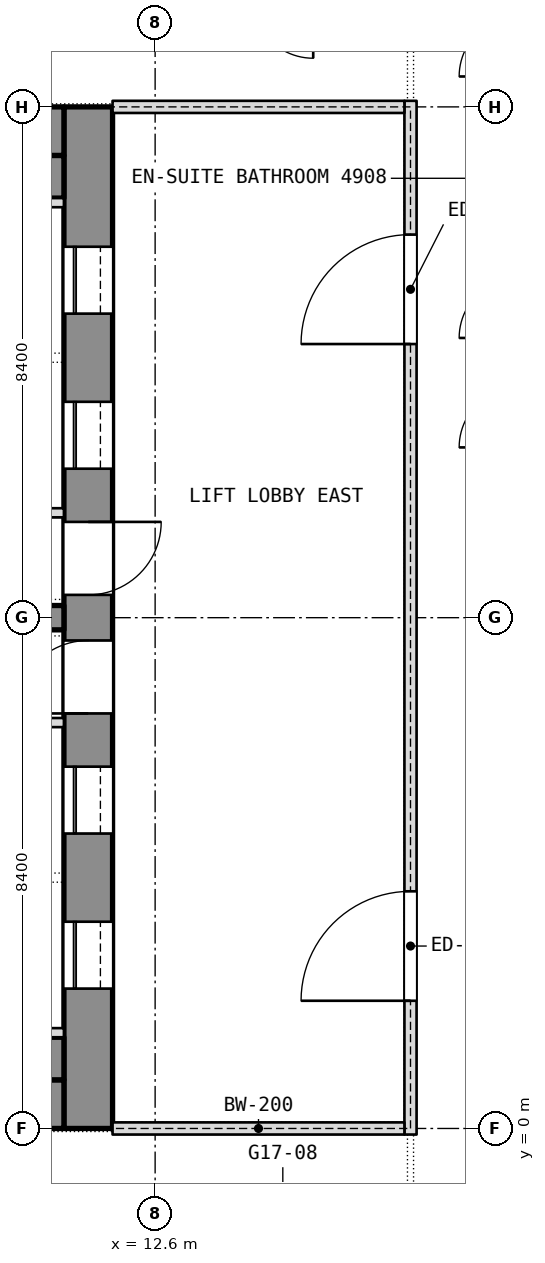
"""IFC4 building model, lengths in metres.
Left out: names, types, materials, properties, quantities, classifications, styles, units other than length and angle.
Written with IfcOpenShell. Run it as: python <this file> out.ifc"""

import sys

from ifc_helpers import new_model, si_unit, direction, frame, frame_2d, origin, place, context, subcontext, project, spatial, rectangle, extrude, element, fill, save


model = new_model("IFC4")
c1 = context("Model", 3, precision=1e-05, world=origin(), true_north=direction((0.0, 1.0)))
c2 = subcontext(c1, "Body", "Model", "MODEL_VIEW")
j1 = project(units=[si_unit("LENGTHUNIT", "METRE"), si_unit("PLANEANGLEUNIT", "RADIAN")], contexts=[c1])
p1 = place(None, origin())
s1 = spatial("IfcSite", under=j1, at=p1, CompositionType="ELEMENT")
p2 = place(p1, origin())
s2 = spatial("IfcBuilding", under=s1, at=p2, CompositionType="ELEMENT")
p3 = place(p2, frame((0.0, 0.0, 212.9)))
s3 = spatial("IfcBuildingStorey", under=s2, at=p3, CompositionType="ELEMENT", Elevation=212.9)
p4 = place(p3, frame((11.5, 0.0, 0.0), z_axis=(0.0, 0.0, 1.0), x_axis=(0.0, 1.0, 0.0)))
e1 = element("IfcWall", 1, at=p4, inside=s3, PredefinedType="SHEAR", context=c2, shape_type="SweptSolid", body=[
    extrude(rectangle(XDim=16.8, YDim=0.8, at=frame_2d((8.4, 0.0))), origin(), (0.0, 0.0, 1.0), 3.6),
])
p5 = place(p4, frame((2.3, 0.0, 0.0)))
e2 = element("IfcOpeningElement", 2, at=p5, cuts=e1, PredefinedType="OPENING", context=c2, shape_type="SweptSolid", body=[
    extrude(rectangle(XDim=1.1, YDim=2.1, at=frame_2d((0.55, 1.05))), frame((0.0, 0.4, 0.0), z_axis=(0.0, -1.0, 0.0), x_axis=(1.0, 0.0, 0.0)), (0.0, 0.0, 1.0), 0.8),
])
p6 = place(p4, frame((4.85, 0.0, 0.0)))
e3 = element("IfcOpeningElement", 3, at=p6, cuts=e1, PredefinedType="OPENING", context=c2, shape_type="SweptSolid", body=[
    extrude(rectangle(XDim=1.1, YDim=2.1, at=frame_2d((0.55, 1.05))), frame((0.0, 0.4, 0.0), z_axis=(0.0, -1.0, 0.0), x_axis=(1.0, 0.0, 0.0)), (0.0, 0.0, 1.0), 0.8),
])
p7 = place(p4, frame((6.825, 0.0, 0.0)))
e4 = element("IfcOpeningElement", 4, at=p7, cuts=e1, PredefinedType="OPENING", context=c2, shape_type="SweptSolid", body=[
    extrude(rectangle(XDim=1.2, YDim=2.1, at=frame_2d((0.6, 1.05))), frame((0.0, 0.4, 0.0), z_axis=(0.0, -1.0, 0.0), x_axis=(1.0, 0.0, 0.0)), (0.0, 0.0, 1.0), 0.8),
])
p8 = place(p4, frame((13.4, 0.0, 0.0)))
e5 = element("IfcOpeningElement", 5, at=p8, cuts=e1, PredefinedType="OPENING", context=c2, shape_type="SweptSolid", body=[
    extrude(rectangle(XDim=1.1, YDim=2.1, at=frame_2d((0.55, 1.05))), frame((0.0, 0.4, 0.0), z_axis=(0.0, -1.0, 0.0), x_axis=(1.0, 0.0, 0.0)), (0.0, 0.0, 1.0), 0.8),
])
p9 = place(p4, frame((10.85, 0.0, 0.0)))
e6 = element("IfcOpeningElement", 6, at=p9, cuts=e1, PredefinedType="OPENING", context=c2, shape_type="SweptSolid", body=[
    extrude(rectangle(XDim=1.1, YDim=2.1, at=frame_2d((0.55, 1.05))), frame((0.0, 0.4, 0.0), z_axis=(0.0, -1.0, 0.0), x_axis=(1.0, 0.0, 0.0)), (0.0, 0.0, 1.0), 0.8),
])
p10 = place(p4, frame((8.775, 0.0, 0.0)))
e7 = element("IfcOpeningElement", 7, at=p10, cuts=e1, PredefinedType="OPENING", context=c2, shape_type="SweptSolid", body=[
    extrude(rectangle(XDim=1.2, YDim=2.1, at=frame_2d((0.6, 1.05))), frame((0.0, 0.4, 0.0), z_axis=(0.0, -1.0, 0.0), x_axis=(1.0, 0.0, 0.0)), (0.0, 0.0, 1.0), 0.8),
])
for number, where, z_axis, x_axis in (
    (8, (-11.1, 0.4, 0.0), (0.0, 0.0, 1.0), (1.0, 0.0, 0.0)),
    (9, (-11.1, 16.4, 0.0), (0.0, 0.0, 1.0), (1.0, 0.0, 0.0)),
):
    element("IfcWall", number, at=place(p3, frame(where, z_axis=z_axis, x_axis=x_axis)), inside=s3, PredefinedType="SHEAR", context=c2, shape_type="SweptSolid", body=[
        extrude(rectangle(XDim=22.2, YDim=0.8, at=frame_2d((11.1, 0.0))), origin(), (0.0, 0.0, 1.0), 3.6),
    ])
p11 = place(p3, frame((4.4, 8.4, 0.0), z_axis=(0.0, 0.0, 1.0), x_axis=(1.0, 0.0, 0.0)))
e10 = element("IfcWall", 10, at=p11, inside=s3, PredefinedType="SHEAR", context=c2, shape_type="SweptSolid", body=[
    extrude(rectangle(XDim=6.7, YDim=0.4, at=frame_2d((3.35, 0.0))), origin(), (0.0, 0.0, 1.0), 3.6),
])
for number, where, z_axis, x_axis in (
    (11, (-11.1, 1.15, 0.0), (0.0, 0.0, 1.0), (1.0, 0.0, 0.0)),
    (12, (-11.1, 15.65, 0.0), (0.0, 0.0, 1.0), (1.0, 0.0, 0.0)),
):
    element("IfcWall", number, at=place(p3, frame(where, z_axis=z_axis, x_axis=x_axis)), inside=s3, PredefinedType="PARTITIONING", context=c2, shape_type="SweptSolid", body=[
        extrude(rectangle(XDim=22.2, YDim=0.7, at=frame_2d((11.1, 0.0))), origin(), (0.0, 0.0, 1.0), 3.34),
    ])
for number, where, z_axis, x_axis in (
    (13, (9.0, 6.675, 0.0), (0.0, 0.0, 1.0), (1.0, 0.0, 0.0)),
    (14, (9.0, 1.575, 0.0), (0.0, 0.0, 1.0), (1.0, 0.0, 0.0)),
    (15, (9.0, 10.125, 0.0), (0.0, 0.0, 1.0), (1.0, 0.0, 0.0)),
    (16, (9.0, 15.225, 0.0), (0.0, 0.0, 1.0), (1.0, 0.0, 0.0)),
):
    element("IfcWall", number, at=place(p3, frame(where, z_axis=z_axis, x_axis=x_axis)), inside=s3, PredefinedType="SHEAR", context=c2, shape_type="SweptSolid", body=[
        extrude(rectangle(XDim=2.1, YDim=0.15, at=frame_2d((1.05, 0.0))), origin(), (0.0, 0.0, 1.0), 3.6),
    ])
p12 = place(p3, frame((16.8, -0.1, 0.0), z_axis=(0.0, 0.0, 1.0), x_axis=(0.0, 1.0, 0.0)))
e17 = element("IfcWall", 17, at=p12, inside=s3, PredefinedType="PARTITIONING", context=c2, shape_type="SweptSolid", body=[
    extrude(rectangle(XDim=17.0, YDim=0.2, at=frame_2d((8.5, 0.0))), origin(), (0.0, 0.0, 1.0), 3.34),
])
p13 = place(p12, frame((2.2, 0.0, 0.0)))
e18 = element("IfcOpeningElement", 18, at=p13, cuts=e17, PredefinedType="OPENING", context=c2, shape_type="SweptSolid", body=[
    extrude(rectangle(XDim=1.8, YDim=2.1, at=frame_2d((0.9, 1.05))), frame((0.0, 0.1, 0.0), z_axis=(0.0, -1.0, 0.0), x_axis=(1.0, 0.0, 0.0)), (0.0, 0.0, 1.0), 0.2),
])
p14 = place(p12, frame((13.0, 0.0, 0.0)))
e19 = element("IfcOpeningElement", 19, at=p14, cuts=e17, PredefinedType="OPENING", context=c2, shape_type="SweptSolid", body=[
    extrude(rectangle(XDim=1.8, YDim=2.1, at=frame_2d((0.9, 1.05))), frame((0.0, 0.1, 0.0), z_axis=(0.0, -1.0, 0.0), x_axis=(1.0, 0.0, 0.0)), (0.0, 0.0, 1.0), 0.2),
])
for number, where, z_axis, x_axis in (
    (20, (11.9, 0.0, 0.0), (0.0, 0.0, 1.0), (1.0, 0.0, 0.0)),
    (21, (11.9, 16.8, 0.0), (0.0, 0.0, 1.0), (1.0, 0.0, 0.0)),
):
    element("IfcWall", number, at=place(p3, frame(where, z_axis=z_axis, x_axis=x_axis)), inside=s3, PredefinedType="PARTITIONING", context=c2, shape_type="SweptSolid", body=[
        extrude(rectangle(XDim=4.8, YDim=0.2, at=frame_2d((2.4, 0.0))), origin(), (0.0, 0.0, 1.0), 2.94),
    ])
p15 = place(p5, origin())
e22 = element("IfcDoor", 22, at=p15, inside=s3, OperationType="SLIDING_TO_LEFT", PredefinedType="DOOR", context=c2, shape_type="SweptSolid", body=[
    extrude(rectangle(XDim=1.1, YDim=2.1, at=frame_2d((0.55, 1.05))), frame((0.0, 0.025, 0.0), z_axis=(0.0, -1.0, 0.0), x_axis=(1.0, 0.0, 0.0)), (0.0, 0.0, 1.0), 0.05),
])
fill(e2, e22)
p16 = place(p6, origin())
e23 = element("IfcDoor", 23, at=p16, inside=s3, OperationType="SLIDING_TO_LEFT", PredefinedType="DOOR", context=c2, shape_type="SweptSolid", body=[
    extrude(rectangle(XDim=1.1, YDim=2.1, at=frame_2d((0.55, 1.05))), frame((0.0, 0.025, 0.0), z_axis=(0.0, -1.0, 0.0), x_axis=(1.0, 0.0, 0.0)), (0.0, 0.0, 1.0), 0.05),
])
fill(e3, e23)
p17 = place(p7, origin())
e24 = element("IfcDoor", 24, at=p17, inside=s3, OperationType="SINGLE_SWING_LEFT", PredefinedType="DOOR", context=c2, shape_type="SweptSolid", body=[
    extrude(rectangle(XDim=1.2, YDim=2.1, at=frame_2d((0.6, 1.05))), frame((0.0, 0.025, 0.0), z_axis=(0.0, -1.0, 0.0), x_axis=(1.0, 0.0, 0.0)), (0.0, 0.0, 1.0), 0.05),
])
fill(e4, e24)
p18 = place(p8, origin())
e25 = element("IfcDoor", 25, at=p18, inside=s3, OperationType="SLIDING_TO_LEFT", PredefinedType="DOOR", context=c2, shape_type="SweptSolid", body=[
    extrude(rectangle(XDim=1.1, YDim=2.1, at=frame_2d((0.55, 1.05))), frame((0.0, 0.025, 0.0), z_axis=(0.0, -1.0, 0.0), x_axis=(1.0, 0.0, 0.0)), (0.0, 0.0, 1.0), 0.05),
])
fill(e5, e25)
p19 = place(p9, origin())
e26 = element("IfcDoor", 26, at=p19, inside=s3, OperationType="SLIDING_TO_LEFT", PredefinedType="DOOR", context=c2, shape_type="SweptSolid", body=[
    extrude(rectangle(XDim=1.1, YDim=2.1, at=frame_2d((0.55, 1.05))), frame((0.0, 0.025, 0.0), z_axis=(0.0, -1.0, 0.0), x_axis=(1.0, 0.0, 0.0)), (0.0, 0.0, 1.0), 0.05),
])
fill(e6, e26)
p20 = place(p10, origin())
e27 = element("IfcDoor", 27, at=p20, inside=s3, OperationType="SINGLE_SWING_LEFT", PredefinedType="DOOR", context=c2, shape_type="SweptSolid", body=[
    extrude(rectangle(XDim=1.2, YDim=2.1, at=frame_2d((0.6, 1.05))), frame((0.0, 0.025, 0.0), z_axis=(0.0, -1.0, 0.0), x_axis=(1.0, 0.0, 0.0)), (0.0, 0.0, 1.0), 0.05),
])
fill(e7, e27)
p21 = place(p13, origin())
e28 = element("IfcDoor", 28, at=p21, inside=s3, OperationType="DOUBLE_DOOR_SINGLE_SWING", PredefinedType="DOOR", context=c2, shape_type="SweptSolid", body=[
    extrude(rectangle(XDim=1.8, YDim=2.1, at=frame_2d((0.9, 1.05))), frame((0.0, 0.025, 0.0), z_axis=(0.0, -1.0, 0.0), x_axis=(1.0, 0.0, 0.0)), (0.0, 0.0, 1.0), 0.05),
])
fill(e18, e28)
p22 = place(p14, origin())
e29 = element("IfcDoor", 29, at=p22, inside=s3, OperationType="DOUBLE_DOOR_SINGLE_SWING", PredefinedType="DOOR", context=c2, shape_type="SweptSolid", body=[
    extrude(rectangle(XDim=1.8, YDim=2.1, at=frame_2d((0.9, 1.05))), frame((0.0, 0.025, 0.0), z_axis=(0.0, -1.0, 0.0), x_axis=(1.0, 0.0, 0.0)), (0.0, 0.0, 1.0), 0.05),
])
fill(e19, e29)
save(model, sys.argv[1])
